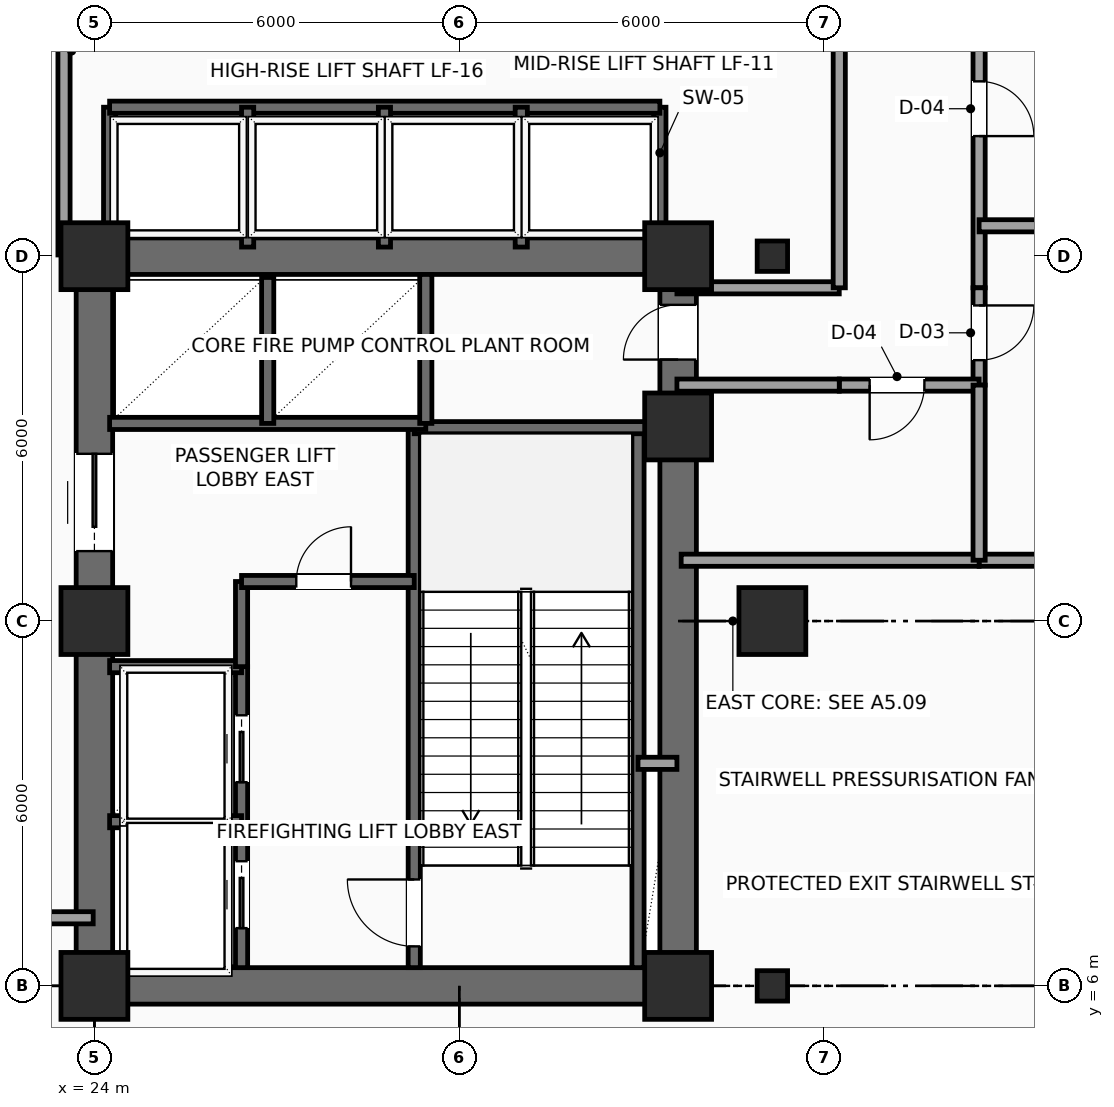
"""IFC4 building model, lengths in metres.
Left out: names, types, materials, properties, quantities, classifications, styles, units other than length and angle.
Written with IfcOpenShell. Run it as: python <this file> out.ifc"""

import sys

from ifc_helpers import new_model, si_unit, direction, frame, frame_2d, origin, origin_2d, place, context, subcontext, project, spatial, rectangle, hollow_rectangle, extrude, element, fill, save


model = new_model("IFC4")
c1 = context("Model", 3, precision=1e-05, world=origin(), true_north=direction((0.0, 1.0)))
c2 = subcontext(c1, "Body", "Model", "MODEL_VIEW")
j1 = project(units=[si_unit("LENGTHUNIT", "METRE"), si_unit("PLANEANGLEUNIT", "RADIAN")], contexts=[c1])
p1 = place(None, origin())
s1 = spatial("IfcSite", under=j1, at=p1, CompositionType="ELEMENT")
p2 = place(p1, origin())
s2 = spatial("IfcBuilding", under=s1, at=p2, CompositionType="ELEMENT")
p3 = place(p2, frame((0.0, 0.0, 164.4)))
s3 = spatial("IfcBuildingStorey", under=s2, at=p3, CompositionType="ELEMENT", Elevation=164.4)
for number, where, z_axis, x_axis in (
    (1, (24.0, 6.0, 0.0), (0.0, 0.0, 1.0), (1.0, 0.0, 0.0)),
    (2, (24.0, 12.0, 0.0), (0.0, 0.0, 1.0), (1.0, 0.0, 0.0)),
    (3, (24.0, 18.0, 0.0), (0.0, 0.0, 1.0), (1.0, 0.0, 0.0)),
    (4, (33.6, 6.0, 0.0), (0.0, 0.0, 1.0), (1.0, 0.0, 0.0)),
    (5, (33.6, 15.2, 0.0), (0.0, 0.0, 1.0), (1.0, 0.0, 0.0)),
    (6, (33.6, 18.0, 0.0), (0.0, 0.0, 1.0), (1.0, 0.0, 0.0)),
):
    element("IfcColumn", number, at=place(p3, frame(where, z_axis=z_axis, x_axis=x_axis)), inside=s3, PredefinedType="COLUMN", context=c2, shape_type="SweptSolid", body=[
        extrude(rectangle(XDim=1.1, YDim=1.1, at=origin_2d()), origin(), (0.0, 0.0, 1.0), 4.8),
    ])
p4 = place(p3, frame((35.15, 6.0, 0.0), z_axis=(0.0, 0.0, 1.0), x_axis=(1.0, 0.0, 0.0)))
e7 = element("IfcColumn", 7, at=p4, inside=s3, PredefinedType="COLUMN", context=c2, shape_type="SweptSolid", body=[
    extrude(hollow_rectangle(XDim=0.5, YDim=0.5, WallThickness=0.025, InnerFilletRadius=0.025, OuterFilletRadius=0.04, at=origin_2d()), origin(), (0.0, 0.0, 1.0), 4.8),
])
p5 = place(p3, frame((35.15, 12.0, 0.0), z_axis=(0.0, 0.0, 1.0), x_axis=(1.0, 0.0, 0.0)))
e8 = element("IfcColumn", 8, at=p5, inside=s3, PredefinedType="COLUMN", context=c2, shape_type="SweptSolid", body=[
    extrude(rectangle(XDim=1.1, YDim=1.1, at=origin_2d()), origin(), (0.0, 0.0, 1.0), 4.8),
])
p6 = place(p3, frame((35.15, 18.0, 0.0), z_axis=(0.0, 0.0, 1.0), x_axis=(1.0, 0.0, 0.0)))
e9 = element("IfcColumn", 9, at=p6, inside=s3, PredefinedType="COLUMN", context=c2, shape_type="SweptSolid", body=[
    extrude(hollow_rectangle(XDim=0.5, YDim=0.5, WallThickness=0.025, InnerFilletRadius=0.025, OuterFilletRadius=0.04, at=origin_2d()), origin(), (0.0, 0.0, 1.0), 4.8),
])
for number, where, z_axis, x_axis in (
    (10, (24.0, 6.0, 0.0), (0.0, 0.0, 1.0), (1.0, 0.0, 0.0)),
    (11, (24.0, 18.0, 0.0), (0.0, 0.0, 1.0), (1.0, 0.0, 0.0)),
):
    element("IfcWall", number, at=place(p3, frame(where, z_axis=z_axis, x_axis=x_axis)), inside=s3, PredefinedType="SHEAR", context=c2, shape_type="SweptSolid", body=[
        extrude(rectangle(XDim=9.6, YDim=0.6, at=frame_2d((4.8, 0.0))), origin(), (0.0, 0.0, 1.0), 4.59),
    ])
p7 = place(p3, frame((24.0, 6.0, 0.0), z_axis=(0.0, 0.0, 1.0), x_axis=(0.0, 1.0, 0.0)))
e12 = element("IfcWall", 12, at=p7, inside=s3, PredefinedType="SHEAR", context=c2, shape_type="SweptSolid", body=[
    extrude(rectangle(XDim=12.0, YDim=0.6, at=frame_2d((6.0, 0.0))), origin(), (0.0, 0.0, 1.0), 4.59),
])
p8 = place(p7, frame((7.15, 0.0, 0.0)))
e13 = element("IfcOpeningElement", 13, at=p8, cuts=e12, PredefinedType="OPENING", context=c2, shape_type="SweptSolid", body=[
    extrude(rectangle(XDim=1.6, YDim=2.3, at=frame_2d((0.8, 1.15))), frame((0.0, 0.31, 0.0), z_axis=(0.0, -1.0, 0.0), x_axis=(1.0, 0.0, 0.0)), (0.0, 0.0, 1.0), 0.62),
])
p9 = place(p3, frame((33.6, 6.0, 0.0), z_axis=(0.0, 0.0, 1.0), x_axis=(0.0, 1.0, 0.0)))
e14 = element("IfcWall", 14, at=p9, inside=s3, PredefinedType="SHEAR", context=c2, shape_type="SweptSolid", body=[
    extrude(rectangle(XDim=12.0, YDim=0.6, at=frame_2d((6.0, 0.0))), origin(), (0.0, 0.0, 1.0), 4.59),
])
p10 = place(p9, frame((10.3, 0.0, 0.0)))
e15 = element("IfcOpeningElement", 15, at=p10, cuts=e14, PredefinedType="OPENING", context=c2, shape_type="SweptSolid", body=[
    extrude(rectangle(XDim=0.9, YDim=2.15, at=frame_2d((0.45, 1.075))), frame((0.0, 0.31, 0.0), z_axis=(0.0, -1.0, 0.0), x_axis=(1.0, 0.0, 0.0)), (0.0, 0.0, 1.0), 0.62),
])
p11 = place(p3, frame((29.26, 6.3, 0.0), z_axis=(0.0, 0.0, 1.0), x_axis=(0.0, 1.0, 0.0)))
e16 = element("IfcWall", 16, at=p11, inside=s3, PredefinedType="SHEAR", context=c2, shape_type="SweptSolid", body=[
    extrude(rectangle(XDim=8.88, YDim=0.2, at=frame_2d((4.44, 0.0))), origin(), (0.0, 0.0, 1.0), 4.59),
])
p12 = place(p11, frame((0.35, 0.0, 0.0)))
e17 = element("IfcOpeningElement", 17, at=p12, cuts=e16, PredefinedType="OPENING", context=c2, shape_type="SweptSolid", body=[
    extrude(rectangle(XDim=1.1, YDim=2.2, at=frame_2d((0.55, 1.1))), frame((0.0, 0.11, 0.0), z_axis=(0.0, -1.0, 0.0), x_axis=(1.0, 0.0, 0.0)), (0.0, 0.0, 1.0), 0.22),
])
p13 = place(p3, frame((32.94, 6.3, 0.0), z_axis=(0.0, 0.0, 1.0), x_axis=(0.0, 1.0, 0.0)))
e18 = element("IfcWall", 18, at=p13, inside=s3, PredefinedType="SHEAR", context=c2, shape_type="SweptSolid", body=[
    extrude(rectangle(XDim=8.88, YDim=0.2, at=frame_2d((4.44, 0.0))), origin(), (0.0, 0.0, 1.0), 4.59),
])
p14 = place(p3, frame((29.26, 15.18, 0.0), z_axis=(0.0, 0.0, 1.0), x_axis=(1.0, 0.0, 0.0)))
e19 = element("IfcWall", 19, at=p14, inside=s3, PredefinedType="SHEAR", context=c2, shape_type="SweptSolid", body=[
    extrude(rectangle(XDim=4.04, YDim=0.2, at=frame_2d((2.02, 0.0))), origin(), (0.0, 0.0, 1.0), 4.59),
])
p15 = place(p3, frame((26.42, 6.3, 0.0), z_axis=(0.0, 0.0, 1.0), x_axis=(0.0, 1.0, 0.0)))
e20 = element("IfcWall", 20, at=p15, inside=s3, PredefinedType="SHEAR", context=c2, shape_type="SweptSolid", body=[
    extrude(rectangle(XDim=4.95, YDim=0.2, at=frame_2d((2.475, 0.0))), origin(), (0.0, 0.0, 1.0), 4.59),
])
p16 = place(p15, frame((0.65, 0.0, 0.0)))
e21 = element("IfcOpeningElement", 21, at=p16, cuts=e20, PredefinedType="OPENING", context=c2, shape_type="SweptSolid", body=[
    extrude(rectangle(XDim=1.1, YDim=2.2, at=frame_2d((0.55, 1.1))), frame((0.0, 0.11, 0.0), z_axis=(0.0, -1.0, 0.0), x_axis=(1.0, 0.0, 0.0)), (0.0, 0.0, 1.0), 0.22),
])
p17 = place(p15, frame((3.05, 0.0, 0.0)))
e22 = element("IfcOpeningElement", 22, at=p17, cuts=e20, PredefinedType="OPENING", context=c2, shape_type="SweptSolid", body=[
    extrude(rectangle(XDim=1.1, YDim=2.2, at=frame_2d((0.55, 1.1))), frame((0.0, 0.11, 0.0), z_axis=(0.0, -1.0, 0.0), x_axis=(1.0, 0.0, 0.0)), (0.0, 0.0, 1.0), 0.22),
])
for number, where, z_axis, x_axis in (
    (23, (24.25, 8.7, 0.0), (0.0, 0.0, 1.0), (1.0, 0.0, 0.0)),
    (24, (24.25, 11.25, 0.0), (0.0, 0.0, 1.0), (1.0, 0.0, 0.0)),
):
    element("IfcWall", number, at=place(p3, frame(where, z_axis=z_axis, x_axis=x_axis)), inside=s3, PredefinedType="SHEAR", context=c2, shape_type="SweptSolid", body=[
        extrude(rectangle(XDim=2.17, YDim=0.2, at=frame_2d((1.085, 0.0))), origin(), (0.0, 0.0, 1.0), 4.59),
    ])
p18 = place(p3, frame((26.42, 11.25, 0.0), z_axis=(0.0, 0.0, 1.0), x_axis=(0.0, 1.0, 0.0)))
e25 = element("IfcWall", 25, at=p18, inside=s3, PredefinedType="SHEAR", context=c2, shape_type="SweptSolid", body=[
    extrude(rectangle(XDim=1.4, YDim=0.2, at=frame_2d((0.7, 0.0))), origin(), (0.0, 0.0, 1.0), 4.59),
])
p19 = place(p3, frame((26.42, 12.65, 0.0), z_axis=(0.0, 0.0, 1.0), x_axis=(1.0, 0.0, 0.0)))
e26 = element("IfcWall", 26, at=p19, inside=s3, PredefinedType="SHEAR", context=c2, shape_type="SweptSolid", body=[
    extrude(rectangle(XDim=2.84, YDim=0.2, at=frame_2d((1.42, 0.0))), origin(), (0.0, 0.0, 1.0), 4.59),
])
p20 = place(p19, frame((0.9, 0.0, 0.0)))
e27 = element("IfcOpeningElement", 27, at=p20, cuts=e26, PredefinedType="OPENING", context=c2, shape_type="SweptSolid", body=[
    extrude(rectangle(XDim=0.9, YDim=2.15, at=frame_2d((0.45, 1.075))), frame((0.0, 0.11, 0.0), z_axis=(0.0, -1.0, 0.0), x_axis=(1.0, 0.0, 0.0)), (0.0, 0.0, 1.0), 0.22),
])
p21 = place(p3, frame((32.94, 9.66, 0.0), z_axis=(0.0, 0.0, 1.0), x_axis=(1.0, 0.0, 0.0)))
e28 = element("IfcWall", 28, at=p21, inside=s3, PredefinedType="SOLIDWALL", context=c2, shape_type="SweptSolid", body=[
    extrude(rectangle(XDim=0.64, YDim=0.2, at=frame_2d((0.32, 0.0))), origin(), (0.0, 0.0, 1.0), 4.59),
])
p22 = place(p3, frame((24.25, 15.25, 0.0), z_axis=(0.0, 0.0, 1.0), x_axis=(1.0, 0.0, 0.0)))
e29 = element("IfcWall", 29, at=p22, inside=s3, PredefinedType="SHEAR", context=c2, shape_type="SweptSolid", body=[
    extrude(rectangle(XDim=5.2, YDim=0.2, at=frame_2d((2.6, 0.0))), origin(), (0.0, 0.0, 1.0), 4.59),
])
p23 = place(p3, frame((26.85, 15.25, 0.0), z_axis=(0.0, 0.0, 1.0), x_axis=(0.0, 1.0, 0.0)))
e30 = element("IfcWall", 30, at=p23, inside=s3, PredefinedType="SHEAR", context=c2, shape_type="SweptSolid", body=[
    extrude(rectangle(XDim=2.4, YDim=0.2, at=frame_2d((1.2, 0.0))), origin(), (0.0, 0.0, 1.0), 4.59),
])
p24 = place(p3, frame((29.45, 15.25, 0.0), z_axis=(0.0, 0.0, 1.0), x_axis=(0.0, 1.0, 0.0)))
e31 = element("IfcWall", 31, at=p24, inside=s3, PredefinedType="SHEAR", context=c2, shape_type="SweptSolid", body=[
    extrude(rectangle(XDim=2.45, YDim=0.2, at=frame_2d((1.225, 0.0))), origin(), (0.0, 0.0, 1.0), 4.59),
])
for number, where, z_axis, x_axis in (
    (32, (33.3, 18.1, 0.0), (0.0, 0.0, 1.0), (0.0, 1.0, 0.0)),
    (33, (24.25, 18.1, 0.0), (0.0, 0.0, 1.0), (0.0, 1.0, 0.0)),
):
    element("IfcWall", number, at=place(p3, frame(where, z_axis=z_axis, x_axis=x_axis)), inside=s3, PredefinedType="SHEAR", context=c2, shape_type="SweptSolid", body=[
        extrude(rectangle(XDim=2.35, YDim=0.2, at=frame_2d((1.175, 0.0))), origin(), (0.0, 0.0, 1.0), 4.59),
    ])
p25 = place(p3, frame((24.25, 20.45, 0.0), z_axis=(0.0, 0.0, 1.0), x_axis=(1.0, 0.0, 0.0)))
e34 = element("IfcWall", 34, at=p25, inside=s3, PredefinedType="SHEAR", context=c2, shape_type="SweptSolid", body=[
    extrude(rectangle(XDim=9.05, YDim=0.2, at=frame_2d((4.525, 0.0))), origin(), (0.0, 0.0, 1.0), 4.59),
])
for number, where, z_axis, x_axis in (
    (35, (26.52, 18.15, 0.0), (0.0, 0.0, 1.0), (0.0, 1.0, 0.0)),
    (36, (28.77, 18.15, 0.0), (0.0, 0.0, 1.0), (0.0, 1.0, 0.0)),
    (37, (31.02, 18.15, 0.0), (0.0, 0.0, 1.0), (0.0, 1.0, 0.0)),
):
    element("IfcWall", number, at=place(p3, frame(where, z_axis=z_axis, x_axis=x_axis)), inside=s3, PredefinedType="SHEAR", context=c2, shape_type="SweptSolid", body=[
        extrude(rectangle(XDim=2.3, YDim=0.2, at=frame_2d((1.15, 0.0))), origin(), (0.0, 0.0, 1.0), 4.59),
    ])
p26 = place(p3, frame((38.55, 21.6, 0.0), z_axis=(0.0, 0.0, 1.0), x_axis=(0.0, -1.0, 0.0)))
e38 = element("IfcWall", 38, at=p26, inside=s3, PredefinedType="SOLIDWALL", context=c2, shape_type="SweptSolid", body=[
    extrude(rectangle(XDim=4.12, YDim=0.2, at=frame_2d((2.06, 0.0))), origin(), (0.0, 0.0, 1.0), 4.59),
])
p27 = place(p26, frame((0.725, 0.0, 0.0)))
e39 = element("IfcOpeningElement", 39, at=p27, cuts=e38, PredefinedType="OPENING", context=c2, shape_type="SweptSolid", body=[
    extrude(rectangle(XDim=0.9, YDim=2.15, at=frame_2d((0.45, 1.075))), frame((0.0, 0.11, 0.0), z_axis=(0.0, -1.0, 0.0), x_axis=(1.0, 0.0, 0.0)), (0.0, 0.0, 1.0), 0.22),
])
p28 = place(p3, frame((38.55, 17.48, 0.0), z_axis=(0.0, 0.0, 1.0), x_axis=(0.0, -1.0, 0.0)))
e40 = element("IfcWall", 40, at=p28, inside=s3, PredefinedType="SOLIDWALL", context=c2, shape_type="SweptSolid", body=[
    extrude(rectangle(XDim=1.6, YDim=0.2, at=frame_2d((0.8, 0.0))), origin(), (0.0, 0.0, 1.0), 4.59),
])
p29 = place(p28, frame((0.29, 0.0, 0.0)))
e41 = element("IfcOpeningElement", 41, at=p29, cuts=e40, PredefinedType="OPENING", context=c2, shape_type="SweptSolid", body=[
    extrude(rectangle(XDim=0.9, YDim=2.15, at=frame_2d((0.45, 1.075))), frame((0.0, 0.11, 0.0), z_axis=(0.0, -1.0, 0.0), x_axis=(1.0, 0.0, 0.0)), (0.0, 0.0, 1.0), 0.22),
])
p30 = place(p3, frame((38.55, 15.88, 0.0), z_axis=(0.0, 0.0, 1.0), x_axis=(-1.0, 0.0, 0.0)))
e42 = element("IfcWall", 42, at=p30, inside=s3, PredefinedType="SOLIDWALL", context=c2, shape_type="SweptSolid", body=[
    extrude(rectangle(XDim=2.3, YDim=0.2, at=frame_2d((1.15, 0.0))), origin(), (0.0, 0.0, 1.0), 4.59),
])
p31 = place(p30, frame((0.9, 0.0, 0.0)))
e43 = element("IfcOpeningElement", 43, at=p31, cuts=e42, PredefinedType="OPENING", context=c2, shape_type="SweptSolid", body=[
    extrude(rectangle(XDim=0.9, YDim=2.15, at=frame_2d((0.45, 1.075))), frame((0.0, 0.11, 0.0), z_axis=(0.0, -1.0, 0.0), x_axis=(1.0, 0.0, 0.0)), (0.0, 0.0, 1.0), 0.22),
])
for number, where, z_axis, x_axis in (
    (44, (36.25, 15.88, 0.0), (0.0, 0.0, 1.0), (-1.0, 0.0, 0.0)),
    (45, (33.58, 17.48, 0.0), (0.0, 0.0, 1.0), (1.0, 0.0, 0.0)),
):
    element("IfcWall", number, at=place(p3, frame(where, z_axis=z_axis, x_axis=x_axis)), inside=s3, PredefinedType="SOLIDWALL", context=c2, shape_type="SweptSolid", body=[
        extrude(rectangle(XDim=2.67, YDim=0.2, at=frame_2d((1.335, 0.0))), origin(), (0.0, 0.0, 1.0), 4.59),
    ])
p32 = place(p3, frame((36.25, 17.48, 0.0), z_axis=(0.0, 0.0, 1.0), x_axis=(0.0, 1.0, 0.0)))
e46 = element("IfcWall", 46, at=p32, inside=s3, PredefinedType="SOLIDWALL", context=c2, shape_type="SweptSolid", body=[
    extrude(rectangle(XDim=4.12, YDim=0.2, at=frame_2d((2.06, 0.0))), origin(), (0.0, 0.0, 1.0), 4.59),
])
p33 = place(p3, frame((23.5, 21.6, 0.0), z_axis=(0.0, 0.0, 1.0), x_axis=(0.0, -1.0, 0.0)))
e47 = element("IfcWall", 47, at=p33, inside=s3, PredefinedType="SOLIDWALL", context=c2, shape_type="SweptSolid", body=[
    extrude(rectangle(XDim=3.58, YDim=0.2, at=frame_2d((1.79, 0.0))), origin(), (0.0, 0.0, 1.0), 4.59),
])
p34 = place(p3, frame((23.98, 7.12, 0.0), z_axis=(0.0, 0.0, 1.0), x_axis=(-1.0, 0.0, 0.0)))
e48 = element("IfcWall", 48, at=p34, inside=s3, PredefinedType="SOLIDWALL", context=c2, shape_type="SweptSolid", body=[
    extrude(rectangle(XDim=3.23, YDim=0.2, at=frame_2d((1.615, 0.0))), origin(), (0.0, 0.0, 1.0), 4.59),
])
for number, where, z_axis, x_axis in (
    (49, (38.55, 13.0, 0.0), (0.0, 0.0, 1.0), (1.0, 0.0, 0.0)),
    (50, (38.55, 18.5, 0.0), (0.0, 0.0, 1.0), (1.0, 0.0, 0.0)),
):
    element("IfcWall", number, at=place(p3, frame(where, z_axis=z_axis, x_axis=x_axis)), inside=s3, PredefinedType="SOLIDWALL", context=c2, shape_type="SweptSolid", body=[
        extrude(rectangle(XDim=8.6, YDim=0.2, at=frame_2d((4.3, 0.0))), origin(), (0.0, 0.0, 1.0), 4.59),
    ])
p35 = place(p3, frame((33.65, 13.0, 0.0), z_axis=(0.0, 0.0, 1.0), x_axis=(1.0, 0.0, 0.0)))
e51 = element("IfcWall", 51, at=p35, inside=s3, PredefinedType="SOLIDWALL", context=c2, shape_type="SweptSolid", body=[
    extrude(rectangle(XDim=4.9, YDim=0.2, at=frame_2d((2.45, 0.0))), origin(), (0.0, 0.0, 1.0), 4.59),
])
p36 = place(p3, frame((38.55, 13.0, 0.0), z_axis=(0.0, 0.0, 1.0), x_axis=(0.0, 1.0, 0.0)))
e52 = element("IfcWall", 52, at=p36, inside=s3, PredefinedType="SOLIDWALL", context=c2, shape_type="SweptSolid", body=[
    extrude(rectangle(XDim=2.88, YDim=0.2, at=frame_2d((1.44, 0.0))), origin(), (0.0, 0.0, 1.0), 4.59),
])
p37 = place(p8, origin())
e53 = element("IfcDoor", 53, at=p37, inside=s3, OperationType="DOUBLE_DOOR_SLIDING", PredefinedType="DOOR", context=c2, shape_type="SweptSolid", body=[
    extrude(rectangle(XDim=1.6, YDim=2.3, at=frame_2d((0.8, 1.15))), frame((0.0, 0.025, 0.0), z_axis=(0.0, -1.0, 0.0), x_axis=(1.0, 0.0, 0.0)), (0.0, 0.0, 1.0), 0.05),
])
fill(e13, e53)
p38 = place(p10, origin())
e54 = element("IfcDoor", 54, at=p38, inside=s3, OperationType="SINGLE_SWING_LEFT", PredefinedType="DOOR", context=c2, shape_type="SweptSolid", body=[
    extrude(rectangle(XDim=0.9, YDim=2.15, at=frame_2d((0.45, 1.075))), frame((0.0, 0.025, 0.0), z_axis=(0.0, -1.0, 0.0), x_axis=(1.0, 0.0, 0.0)), (0.0, 0.0, 1.0), 0.05),
])
fill(e15, e54)
p39 = place(p12, origin())
e55 = element("IfcDoor", 55, at=p39, inside=s3, OperationType="SINGLE_SWING_RIGHT", PredefinedType="DOOR", context=c2, shape_type="SweptSolid", body=[
    extrude(rectangle(XDim=1.1, YDim=2.2, at=frame_2d((0.55, 1.1))), frame((0.0, 0.025, 0.0), z_axis=(0.0, -1.0, 0.0), x_axis=(1.0, 0.0, 0.0)), (0.0, 0.0, 1.0), 0.05),
])
fill(e17, e55)
p40 = place(p16, origin())
e56 = element("IfcDoor", 56, at=p40, inside=s3, OperationType="SLIDING_TO_LEFT", PredefinedType="DOOR", context=c2, shape_type="SweptSolid", body=[
    extrude(rectangle(XDim=1.1, YDim=2.2, at=frame_2d((0.55, 1.1))), frame((0.0, 0.025, 0.0), z_axis=(0.0, -1.0, 0.0), x_axis=(1.0, 0.0, 0.0)), (0.0, 0.0, 1.0), 0.05),
])
fill(e21, e56)
p41 = place(p17, origin())
e57 = element("IfcDoor", 57, at=p41, inside=s3, OperationType="SLIDING_TO_LEFT", PredefinedType="DOOR", context=c2, shape_type="SweptSolid", body=[
    extrude(rectangle(XDim=1.1, YDim=2.2, at=frame_2d((0.55, 1.1))), frame((0.0, 0.025, 0.0), z_axis=(0.0, -1.0, 0.0), x_axis=(1.0, 0.0, 0.0)), (0.0, 0.0, 1.0), 0.05),
])
fill(e22, e57)
p42 = place(p20, origin())
e58 = element("IfcDoor", 58, at=p42, inside=s3, OperationType="SINGLE_SWING_RIGHT", PredefinedType="DOOR", context=c2, shape_type="SweptSolid", body=[
    extrude(rectangle(XDim=0.9, YDim=2.15, at=frame_2d((0.45, 1.075))), frame((0.0, 0.025, 0.0), z_axis=(0.0, -1.0, 0.0), x_axis=(1.0, 0.0, 0.0)), (0.0, 0.0, 1.0), 0.05),
])
fill(e27, e58)
p43 = place(p27, origin())
e59 = element("IfcDoor", 59, at=p43, inside=s3, OperationType="SINGLE_SWING_RIGHT", PredefinedType="DOOR", context=c2, shape_type="SweptSolid", body=[
    extrude(rectangle(XDim=0.9, YDim=2.15, at=frame_2d((0.45, 1.075))), frame((0.0, 0.025, 0.0), z_axis=(0.0, -1.0, 0.0), x_axis=(1.0, 0.0, 0.0)), (0.0, 0.0, 1.0), 0.05),
])
fill(e39, e59)
p44 = place(p29, origin())
e60 = element("IfcDoor", 60, at=p44, inside=s3, OperationType="SINGLE_SWING_LEFT", PredefinedType="DOOR", context=c2, shape_type="SweptSolid", body=[
    extrude(rectangle(XDim=0.9, YDim=2.15, at=frame_2d((0.45, 1.075))), frame((0.0, 0.025, 0.0), z_axis=(0.0, -1.0, 0.0), x_axis=(1.0, 0.0, 0.0)), (0.0, 0.0, 1.0), 0.05),
])
fill(e41, e60)
p45 = place(p31, origin())
e61 = element("IfcDoor", 61, at=p45, inside=s3, OperationType="SINGLE_SWING_RIGHT", PredefinedType="DOOR", context=c2, shape_type="SweptSolid", body=[
    extrude(rectangle(XDim=0.9, YDim=2.15, at=frame_2d((0.45, 1.075))), frame((0.0, 0.025, 0.0), z_axis=(0.0, -1.0, 0.0), x_axis=(1.0, 0.0, 0.0)), (0.0, 0.0, 1.0), 0.05),
])
fill(e43, e61)
save(model, sys.argv[1])
